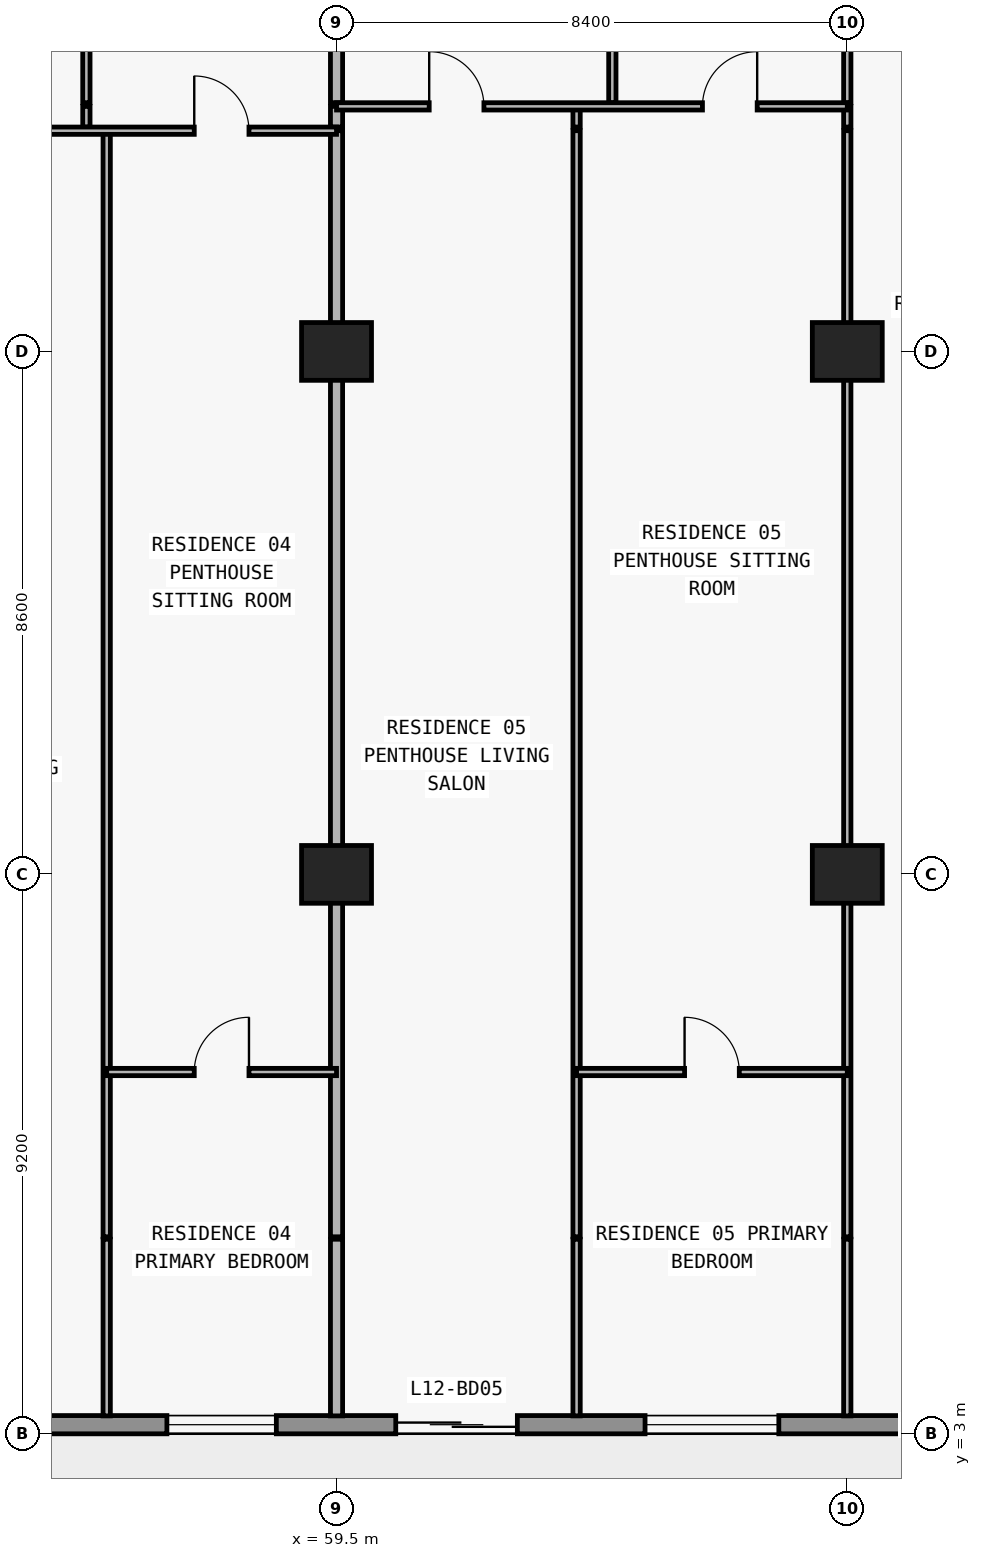
"""IFC4 building model, lengths in metres.
Left out: names, types, materials, properties, quantities, classifications, styles, units other than length and angle.
Written with IfcOpenShell. Run it as: python <this file> out.ifc"""

import sys

from ifc_helpers import new_model, si_unit, direction, frame, frame_2d, origin, origin_2d, place, context, subcontext, project, spatial, rectangle, extrude, element, fill, save


model = new_model("IFC4")
c1 = context("Model", 3, precision=1e-05, world=origin(), true_north=direction((0.0, 1.0)))
c2 = subcontext(c1, "Body", "Model", "MODEL_VIEW")
j1 = project(units=[si_unit("LENGTHUNIT", "METRE"), si_unit("PLANEANGLEUNIT", "RADIAN")], contexts=[c1])
p1 = place(None, origin())
s1 = spatial("IfcSite", under=j1, at=p1, CompositionType="ELEMENT")
p2 = place(p1, origin())
s2 = spatial("IfcBuilding", under=s1, at=p2, CompositionType="ELEMENT")
p3 = place(p2, frame((0.0, 0.0, 49.8)))
s3 = spatial("IfcBuildingStorey", under=s2, at=p3, CompositionType="ELEMENT", Elevation=49.8)
for number, where, z_axis, x_axis in (
    (1, (59.5, 12.2, 0.0), (0.0, 0.0, 1.0), (1.0, 0.0, 0.0)),
    (2, (67.9, 12.2, 0.0), (0.0, 0.0, 1.0), (1.0, 0.0, 0.0)),
    (3, (59.5, 20.8, 0.0), (0.0, 0.0, 1.0), (1.0, 0.0, 0.0)),
    (4, (67.9, 20.8, 0.0), (0.0, 0.0, 1.0), (1.0, 0.0, 0.0)),
):
    element("IfcColumn", number, at=place(p3, frame(where, z_axis=z_axis, x_axis=x_axis)), inside=s3, PredefinedType="COLUMN", context=c2, shape_type="SweptSolid", body=[
        extrude(rectangle(XDim=1.15, YDim=0.95, at=origin_2d()), origin(), (0.0, 0.0, 1.0), 3.05),
    ])
p4 = place(p3, frame((72.7, 3.15, 0.0), z_axis=(0.0, 0.0, 1.0), x_axis=(-1.0, 0.0, 0.0)))
e5 = element("IfcWall", 5, at=p4, inside=s3, PredefinedType="STANDARD", context=c2, shape_type="SweptSolid", body=[
    extrude(rectangle(XDim=67.6, YDim=0.3, at=frame_2d((33.8, 0.0))), origin(), (0.0, 0.0, 1.0), 3.05),
])
p5 = place(p4, frame((59.826, 0.0, 0.0)))
e6 = element("IfcOpeningElement", 6, at=p5, cuts=e5, PredefinedType="OPENING", context=c2, shape_type="SweptSolid", body=[
    extrude(rectangle(XDim=2.0, YDim=2.3, at=frame_2d((1.0, 1.15))), frame((0.0, 0.16, 0.0), z_axis=(0.0, -1.0, 0.0), x_axis=(1.0, 0.0, 0.0)), (0.0, 0.0, 1.0), 0.32),
])
p6 = place(p4, frame((55.526, 0.0, 0.85)))
e7 = element("IfcOpeningElement", 7, at=p6, cuts=e5, PredefinedType="OPENING", context=c2, shape_type="SweptSolid", body=[
    extrude(rectangle(XDim=2.2, YDim=1.55, at=frame_2d((1.1, 0.775))), frame((0.0, 0.16, 0.0), z_axis=(0.0, -1.0, 0.0), x_axis=(1.0, 0.0, 0.0)), (0.0, 0.0, 1.0), 0.32),
])
p7 = place(p4, frame((51.09, 0.0, 0.0)))
e8 = element("IfcOpeningElement", 8, at=p7, cuts=e5, PredefinedType="OPENING", context=c2, shape_type="SweptSolid", body=[
    extrude(rectangle(XDim=2.0, YDim=2.3, at=frame_2d((1.0, 1.15))), frame((0.0, 0.16, 0.0), z_axis=(0.0, -1.0, 0.0), x_axis=(1.0, 0.0, 0.0)), (0.0, 0.0, 1.0), 0.32),
])
p8 = place(p4, frame((46.99, 0.0, 0.85)))
e9 = element("IfcOpeningElement", 9, at=p8, cuts=e5, PredefinedType="OPENING", context=c2, shape_type="SweptSolid", body=[
    extrude(rectangle(XDim=1.8, YDim=1.55, at=frame_2d((0.9, 0.775))), frame((0.0, 0.16, 0.0), z_axis=(0.0, -1.0, 0.0), x_axis=(1.0, 0.0, 0.0)), (0.0, 0.0, 1.0), 0.32),
])
p9 = place(p4, frame((43.09, 0.0, 0.0)))
e10 = element("IfcOpeningElement", 10, at=p9, cuts=e5, PredefinedType="OPENING", context=c2, shape_type="SweptSolid", body=[
    extrude(rectangle(XDim=2.0, YDim=2.3, at=frame_2d((1.0, 1.15))), frame((0.0, 0.16, 0.0), z_axis=(0.0, -1.0, 0.0), x_axis=(1.0, 0.0, 0.0)), (0.0, 0.0, 1.0), 0.32),
])
p10 = place(p4, frame((38.41, 0.0, 0.65)))
e11 = element("IfcOpeningElement", 11, at=p10, cuts=e5, PredefinedType="OPENING", context=c2, shape_type="SweptSolid", body=[
    extrude(rectangle(XDim=2.6, YDim=1.85, at=frame_2d((1.3, 0.925))), frame((0.0, 0.16, 0.0), z_axis=(0.0, -1.0, 0.0), x_axis=(1.0, 0.0, 0.0)), (0.0, 0.0, 1.0), 0.32),
])
p11 = place(p4, frame((32.7, 0.0, 0.85)))
e12 = element("IfcOpeningElement", 12, at=p11, cuts=e5, PredefinedType="OPENING", context=c2, shape_type="SweptSolid", body=[
    extrude(rectangle(XDim=2.2, YDim=1.55, at=frame_2d((1.1, 0.775))), frame((0.0, 0.16, 0.0), z_axis=(0.0, -1.0, 0.0), x_axis=(1.0, 0.0, 0.0)), (0.0, 0.0, 1.0), 0.32),
])
p12 = place(p4, frame((24.7, 0.0, 0.85)))
e13 = element("IfcOpeningElement", 13, at=p12, cuts=e5, PredefinedType="OPENING", context=c2, shape_type="SweptSolid", body=[
    extrude(rectangle(XDim=2.2, YDim=1.55, at=frame_2d((1.1, 0.775))), frame((0.0, 0.16, 0.0), z_axis=(0.0, -1.0, 0.0), x_axis=(1.0, 0.0, 0.0)), (0.0, 0.0, 1.0), 0.32),
])
p13 = place(p4, frame((18.29, 0.0, 0.0)))
e14 = element("IfcOpeningElement", 14, at=p13, cuts=e5, PredefinedType="OPENING", context=c2, shape_type="SweptSolid", body=[
    extrude(rectangle(XDim=2.0, YDim=2.3, at=frame_2d((1.0, 1.15))), frame((0.0, 0.16, 0.0), z_axis=(0.0, -1.0, 0.0), x_axis=(1.0, 0.0, 0.0)), (0.0, 0.0, 1.0), 0.32),
])
p14 = place(p4, frame((14.19, 0.0, 0.85)))
e15 = element("IfcOpeningElement", 15, at=p14, cuts=e5, PredefinedType="OPENING", context=c2, shape_type="SweptSolid", body=[
    extrude(rectangle(XDim=1.8, YDim=1.55, at=frame_2d((0.9, 0.775))), frame((0.0, 0.16, 0.0), z_axis=(0.0, -1.0, 0.0), x_axis=(1.0, 0.0, 0.0)), (0.0, 0.0, 1.0), 0.32),
])
p15 = place(p4, frame((10.226, 0.0, 0.0)))
e16 = element("IfcOpeningElement", 16, at=p15, cuts=e5, PredefinedType="OPENING", context=c2, shape_type="SweptSolid", body=[
    extrude(rectangle(XDim=2.0, YDim=2.3, at=frame_2d((1.0, 1.15))), frame((0.0, 0.16, 0.0), z_axis=(0.0, -1.0, 0.0), x_axis=(1.0, 0.0, 0.0)), (0.0, 0.0, 1.0), 0.32),
])
p16 = place(p4, frame((5.926, 0.0, 0.85)))
e17 = element("IfcOpeningElement", 17, at=p16, cuts=e5, PredefinedType="OPENING", context=c2, shape_type="SweptSolid", body=[
    extrude(rectangle(XDim=2.2, YDim=1.55, at=frame_2d((1.1, 0.775))), frame((0.0, 0.16, 0.0), z_axis=(0.0, -1.0, 0.0), x_axis=(1.0, 0.0, 0.0)), (0.0, 0.0, 1.0), 0.32),
])
p17 = place(p3, frame((55.386, 24.49, 0.0), z_axis=(0.0, 0.0, 1.0), x_axis=(0.0, 1.0, 0.0)))
e18 = element("IfcWall", 18, at=p17, inside=s3, PredefinedType="PARTITIONING", context=c2, shape_type="SweptSolid", body=[
    extrude(rectangle(XDim=0.34, YDim=0.12, at=frame_2d((0.17, 0.0))), origin(), (0.0, 0.0, 1.0), 3.05),
])
p18 = place(p3, frame((55.386, 24.89, 0.0), z_axis=(0.0, 0.0, 1.0), x_axis=(0.0, 1.0, 0.0)))
e19 = element("IfcWall", 19, at=p18, inside=s3, PredefinedType="PARTITIONING", context=c2, shape_type="SweptSolid", body=[
    extrude(rectangle(XDim=4.69, YDim=0.12, at=frame_2d((2.345, 0.0))), origin(), (0.0, 0.0, 1.0), 3.05),
])
p19 = place(p18, frame((1.895, 0.0, 0.0)))
e20 = element("IfcOpeningElement", 20, at=p19, cuts=e19, PredefinedType="OPENING", context=c2, shape_type="SweptSolid", body=[
    extrude(rectangle(XDim=0.9, YDim=2.15, at=frame_2d((0.45, 1.075))), frame((0.0, 0.07, 0.0), z_axis=(0.0, -1.0, 0.0), x_axis=(1.0, 0.0, 0.0)), (0.0, 0.0, 1.0), 0.14),
])
p20 = place(p3, frame((55.72, 3.295, 0.0), z_axis=(0.0, 0.0, 1.0), x_axis=(0.0, 1.0, 0.0)))
e21 = element("IfcWall", 21, at=p20, inside=s3, PredefinedType="PARTITIONING", context=c2, shape_type="SweptSolid", body=[
    extrude(rectangle(XDim=2.905, YDim=0.12, at=frame_2d((1.453, 0.0))), origin(), (0.0, 0.0, 1.0), 3.05),
])
p21 = place(p3, frame((55.72, 6.24, 0.0), z_axis=(0.0, 0.0, 1.0), x_axis=(0.0, 1.0, 0.0)))
e22 = element("IfcWall", 22, at=p21, inside=s3, PredefinedType="PARTITIONING", context=c2, shape_type="SweptSolid", body=[
    extrude(rectangle(XDim=18.19, YDim=0.12, at=frame_2d((9.095, 0.0))), origin(), (0.0, 0.0, 1.0), 3.05),
])
p22 = place(p3, frame((59.5, 3.295, 0.0), z_axis=(0.0, 0.0, 1.0), x_axis=(0.0, 1.0, 0.0)))
e23 = element("IfcWall", 23, at=p22, inside=s3, PredefinedType="PARTITIONING", context=c2, shape_type="SweptSolid", body=[
    extrude(rectangle(XDim=2.905, YDim=0.2, at=frame_2d((1.453, 0.0))), origin(), (0.0, 0.0, 1.0), 3.05),
])
p23 = place(p3, frame((59.5, 6.24, 0.0), z_axis=(0.0, 0.0, 1.0), x_axis=(0.0, 1.0, 0.0)))
e24 = element("IfcWall", 24, at=p23, inside=s3, PredefinedType="PARTITIONING", context=c2, shape_type="SweptSolid", body=[
    extrude(rectangle(XDim=18.19, YDim=0.2, at=frame_2d((9.095, 0.0))), origin(), (0.0, 0.0, 1.0), 2.11),
])
p24 = place(p3, frame((59.5, 24.49, 0.0), z_axis=(0.0, 0.0, 1.0), x_axis=(0.0, 1.0, 0.0)))
e25 = element("IfcWall", 25, at=p24, inside=s3, PredefinedType="PARTITIONING", context=c2, shape_type="SweptSolid", body=[
    extrude(rectangle(XDim=0.34, YDim=0.2, at=frame_2d((0.17, 0.0))), origin(), (0.0, 0.0, 1.0), 2.11),
])
p25 = place(p3, frame((59.5, 24.89, 0.0), z_axis=(0.0, 0.0, 1.0), x_axis=(0.0, 1.0, 0.0)))
e26 = element("IfcWall", 26, at=p25, inside=s3, PredefinedType="PARTITIONING", context=c2, shape_type="SweptSolid", body=[
    extrude(rectangle(XDim=4.69, YDim=0.2, at=frame_2d((2.345, 0.0))), origin(), (0.0, 0.0, 1.0), 2.11),
])
p26 = place(p3, frame((63.448, 3.295, 0.0), z_axis=(0.0, 0.0, 1.0), x_axis=(0.0, 1.0, 0.0)))
e27 = element("IfcWall", 27, at=p26, inside=s3, PredefinedType="PARTITIONING", context=c2, shape_type="SweptSolid", body=[
    extrude(rectangle(XDim=2.905, YDim=0.12, at=frame_2d((1.453, 0.0))), origin(), (0.0, 0.0, 1.0), 3.05),
])
p27 = place(p3, frame((63.448, 6.24, 0.0), z_axis=(0.0, 0.0, 1.0), x_axis=(0.0, 1.0, 0.0)))
e28 = element("IfcWall", 28, at=p27, inside=s3, PredefinedType="PARTITIONING", context=c2, shape_type="SweptSolid", body=[
    extrude(rectangle(XDim=18.19, YDim=0.12, at=frame_2d((9.095, 0.0))), origin(), (0.0, 0.0, 1.0), 3.05),
])
p28 = place(p3, frame((63.448, 24.49, 0.0), z_axis=(0.0, 0.0, 1.0), x_axis=(0.0, 1.0, 0.0)))
e29 = element("IfcWall", 29, at=p28, inside=s3, PredefinedType="PARTITIONING", context=c2, shape_type="SweptSolid", body=[
    extrude(rectangle(XDim=0.34, YDim=0.12, at=frame_2d((0.17, 0.0))), origin(), (0.0, 0.0, 1.0), 3.05),
])
p29 = place(p3, frame((64.036, 24.89, 0.0), z_axis=(0.0, 0.0, 1.0), x_axis=(0.0, 1.0, 0.0)))
e30 = element("IfcWall", 30, at=p29, inside=s3, PredefinedType="PARTITIONING", context=c2, shape_type="SweptSolid", body=[
    extrude(rectangle(XDim=4.69, YDim=0.12, at=frame_2d((2.345, 0.0))), origin(), (0.0, 0.0, 1.0), 3.05),
])
p30 = place(p29, frame((1.895, 0.0, 0.0)))
e31 = element("IfcOpeningElement", 31, at=p30, cuts=e30, PredefinedType="OPENING", context=c2, shape_type="SweptSolid", body=[
    extrude(rectangle(XDim=0.9, YDim=2.15, at=frame_2d((0.45, 1.075))), frame((0.0, 0.07, 0.0), z_axis=(0.0, -1.0, 0.0), x_axis=(1.0, 0.0, 0.0)), (0.0, 0.0, 1.0), 0.14),
])
p31 = place(p3, frame((67.9, 3.295, 0.0), z_axis=(0.0, 0.0, 1.0), x_axis=(0.0, 1.0, 0.0)))
e32 = element("IfcWall", 32, at=p31, inside=s3, PredefinedType="PARTITIONING", context=c2, shape_type="SweptSolid", body=[
    extrude(rectangle(XDim=2.905, YDim=0.12, at=frame_2d((1.453, 0.0))), origin(), (0.0, 0.0, 1.0), 3.05),
])
p32 = place(p3, frame((67.9, 6.24, 0.0), z_axis=(0.0, 0.0, 1.0), x_axis=(0.0, 1.0, 0.0)))
e33 = element("IfcWall", 33, at=p32, inside=s3, PredefinedType="PARTITIONING", context=c2, shape_type="SweptSolid", body=[
    extrude(rectangle(XDim=18.19, YDim=0.12, at=frame_2d((9.095, 0.0))), origin(), (0.0, 0.0, 1.0), 2.11),
])
p33 = place(p3, frame((67.9, 24.49, 0.0), z_axis=(0.0, 0.0, 1.0), x_axis=(0.0, 1.0, 0.0)))
e34 = element("IfcWall", 34, at=p33, inside=s3, PredefinedType="PARTITIONING", context=c2, shape_type="SweptSolid", body=[
    extrude(rectangle(XDim=0.34, YDim=0.12, at=frame_2d((0.17, 0.0))), origin(), (0.0, 0.0, 1.0), 2.11),
])
p34 = place(p3, frame((67.9, 24.89, 0.0), z_axis=(0.0, 0.0, 1.0), x_axis=(0.0, 1.0, 0.0)))
e35 = element("IfcWall", 35, at=p34, inside=s3, PredefinedType="PARTITIONING", context=c2, shape_type="SweptSolid", body=[
    extrude(rectangle(XDim=4.69, YDim=0.12, at=frame_2d((2.345, 0.0))), origin(), (0.0, 0.0, 1.0), 2.11),
])
p35 = place(p34, frame((1.895, 0.0, 0.0)))
e36 = element("IfcOpeningElement", 36, at=p35, cuts=e35, PredefinedType="OPENING", context=c2, shape_type="SweptSolid", body=[
    extrude(rectangle(XDim=0.9, YDim=2.06, at=frame_2d((0.45, 1.03))), frame((0.0, 0.07, 0.0), z_axis=(0.0, -1.0, 0.0), x_axis=(1.0, 0.0, 0.0)), (0.0, 0.0, 1.0), 0.14),
])
p36 = place(p3, frame((55.72, 8.95, 0.0), z_axis=(0.0, 0.0, 1.0), x_axis=(1.0, 0.0, 0.0)))
e37 = element("IfcWall", 37, at=p36, inside=s3, PredefinedType="PARTITIONING", context=c2, shape_type="SweptSolid", body=[
    extrude(rectangle(XDim=3.78, YDim=0.12, at=frame_2d((1.89, 0.0))), origin(), (0.0, 0.0, 1.0), 3.05),
])
p37 = place(p36, frame((1.44, 0.0, 0.0)))
e38 = element("IfcOpeningElement", 38, at=p37, cuts=e37, PredefinedType="OPENING", context=c2, shape_type="SweptSolid", body=[
    extrude(rectangle(XDim=0.9, YDim=2.15, at=frame_2d((0.45, 1.075))), frame((0.0, 0.07, 0.0), z_axis=(0.0, -1.0, 0.0), x_axis=(1.0, 0.0, 0.0)), (0.0, 0.0, 1.0), 0.14),
])
p38 = place(p3, frame((63.448, 8.95, 0.0), z_axis=(0.0, 0.0, 1.0), x_axis=(1.0, 0.0, 0.0)))
e39 = element("IfcWall", 39, at=p38, inside=s3, PredefinedType="PARTITIONING", context=c2, shape_type="SweptSolid", body=[
    extrude(rectangle(XDim=4.452, YDim=0.12, at=frame_2d((2.226, 0.0))), origin(), (0.0, 0.0, 1.0), 3.05),
])
p39 = place(p38, frame((1.776, 0.0, 0.0)))
e40 = element("IfcOpeningElement", 40, at=p39, cuts=e39, PredefinedType="OPENING", context=c2, shape_type="SweptSolid", body=[
    extrude(rectangle(XDim=0.9, YDim=2.15, at=frame_2d((0.45, 1.075))), frame((0.0, 0.07, 0.0), z_axis=(0.0, -1.0, 0.0), x_axis=(1.0, 0.0, 0.0)), (0.0, 0.0, 1.0), 0.14),
])
p40 = place(p3, frame((51.37, 24.43, 0.0), z_axis=(0.0, 0.0, 1.0), x_axis=(1.0, 0.0, 0.0)))
e41 = element("IfcWall", 41, at=p40, inside=s3, PredefinedType="PARTITIONING", context=c2, shape_type="SweptSolid", body=[
    extrude(rectangle(XDim=8.13, YDim=0.12, at=frame_2d((4.065, 0.0))), origin(), (0.0, 0.0, 1.0), 3.05),
])
p41 = place(p40, frame((1.558, 0.0, 0.0)))
e42 = element("IfcOpeningElement", 42, at=p41, cuts=e41, PredefinedType="OPENING", context=c2, shape_type="SweptSolid", body=[
    extrude(rectangle(XDim=0.9, YDim=2.15, at=frame_2d((0.45, 1.075))), frame((0.0, 0.07, 0.0), z_axis=(0.0, -1.0, 0.0), x_axis=(1.0, 0.0, 0.0)), (0.0, 0.0, 1.0), 0.14),
])
p42 = place(p40, frame((5.79, 0.0, 0.0)))
e43 = element("IfcOpeningElement", 43, at=p42, cuts=e41, PredefinedType="OPENING", context=c2, shape_type="SweptSolid", body=[
    extrude(rectangle(XDim=0.9, YDim=2.15, at=frame_2d((0.45, 1.075))), frame((0.0, 0.07, 0.0), z_axis=(0.0, -1.0, 0.0), x_axis=(1.0, 0.0, 0.0)), (0.0, 0.0, 1.0), 0.14),
])
p43 = place(p3, frame((59.5, 24.83, 0.0), z_axis=(0.0, 0.0, 1.0), x_axis=(1.0, 0.0, 0.0)))
e44 = element("IfcWall", 44, at=p43, inside=s3, PredefinedType="PARTITIONING", context=c2, shape_type="SweptSolid", body=[
    extrude(rectangle(XDim=8.4, YDim=0.12, at=frame_2d((4.2, 0.0))), origin(), (0.0, 0.0, 1.0), 3.05),
])
p44 = place(p43, frame((1.524, 0.0, 0.0)))
e45 = element("IfcOpeningElement", 45, at=p44, cuts=e44, PredefinedType="OPENING", context=c2, shape_type="SweptSolid", body=[
    extrude(rectangle(XDim=0.9, YDim=2.15, at=frame_2d((0.45, 1.075))), frame((0.0, 0.07, 0.0), z_axis=(0.0, -1.0, 0.0), x_axis=(1.0, 0.0, 0.0)), (0.0, 0.0, 1.0), 0.14),
])
p45 = place(p43, frame((6.018, 0.0, 0.0)))
e46 = element("IfcOpeningElement", 46, at=p45, cuts=e44, PredefinedType="OPENING", context=c2, shape_type="SweptSolid", body=[
    extrude(rectangle(XDim=0.9, YDim=2.15, at=frame_2d((0.45, 1.075))), frame((0.0, 0.07, 0.0), z_axis=(0.0, -1.0, 0.0), x_axis=(1.0, 0.0, 0.0)), (0.0, 0.0, 1.0), 0.14),
])
p46 = place(p14, origin())
e47 = element("IfcWindow", 47, at=p46, inside=s3, PartitioningType="SINGLE_PANEL", PredefinedType="WINDOW", context=c2, shape_type="SweptSolid", body=[
    extrude(rectangle(XDim=1.8, YDim=1.55, at=frame_2d((0.9, 0.775))), frame((0.0, 0.03, 0.0), z_axis=(0.0, -1.0, 0.0), x_axis=(1.0, 0.0, 0.0)), (0.0, 0.0, 1.0), 0.06),
])
fill(e15, e47)
p47 = place(p15, origin())
e48 = element("IfcDoor", 48, at=p47, inside=s3, OperationType="DOUBLE_DOOR_SLIDING", PredefinedType="DOOR", context=c2, shape_type="SweptSolid", body=[
    extrude(rectangle(XDim=2.0, YDim=2.3, at=frame_2d((1.0, 1.15))), frame((0.0, 0.025, 0.0), z_axis=(0.0, -1.0, 0.0), x_axis=(1.0, 0.0, 0.0)), (0.0, 0.0, 1.0), 0.05),
])
fill(e16, e48)
p48 = place(p16, origin())
e49 = element("IfcWindow", 49, at=p48, inside=s3, PartitioningType="SINGLE_PANEL", PredefinedType="WINDOW", context=c2, shape_type="SweptSolid", body=[
    extrude(rectangle(XDim=2.2, YDim=1.55, at=frame_2d((1.1, 0.775))), frame((0.0, 0.03, 0.0), z_axis=(0.0, -1.0, 0.0), x_axis=(1.0, 0.0, 0.0)), (0.0, 0.0, 1.0), 0.06),
])
fill(e17, e49)
p49 = place(p42, origin())
e50 = element("IfcDoor", 50, at=p49, inside=s3, OperationType="SINGLE_SWING_LEFT", PredefinedType="DOOR", context=c2, shape_type="SweptSolid", body=[
    extrude(rectangle(XDim=0.9, YDim=2.15, at=frame_2d((0.45, 1.075))), frame((0.0, 0.025, 0.0), z_axis=(0.0, -1.0, 0.0), x_axis=(1.0, 0.0, 0.0)), (0.0, 0.0, 1.0), 0.05),
])
fill(e43, e50)
p50 = place(p37, origin())
e51 = element("IfcDoor", 51, at=p50, inside=s3, OperationType="SINGLE_SWING_RIGHT", PredefinedType="DOOR", context=c2, shape_type="SweptSolid", body=[
    extrude(rectangle(XDim=0.9, YDim=2.15, at=frame_2d((0.45, 1.075))), frame((0.0, 0.025, 0.0), z_axis=(0.0, -1.0, 0.0), x_axis=(1.0, 0.0, 0.0)), (0.0, 0.0, 1.0), 0.05),
])
fill(e38, e51)
p51 = place(p44, origin())
e52 = element("IfcDoor", 52, at=p51, inside=s3, OperationType="SINGLE_SWING_LEFT", PredefinedType="DOOR", context=c2, shape_type="SweptSolid", body=[
    extrude(rectangle(XDim=0.9, YDim=2.15, at=frame_2d((0.45, 1.075))), frame((0.0, 0.025, 0.0), z_axis=(0.0, -1.0, 0.0), x_axis=(1.0, 0.0, 0.0)), (0.0, 0.0, 1.0), 0.05),
])
fill(e45, e52)
p52 = place(p45, origin())
e53 = element("IfcDoor", 53, at=p52, inside=s3, OperationType="SINGLE_SWING_RIGHT", PredefinedType="DOOR", context=c2, shape_type="SweptSolid", body=[
    extrude(rectangle(XDim=0.9, YDim=2.15, at=frame_2d((0.45, 1.075))), frame((0.0, 0.025, 0.0), z_axis=(0.0, -1.0, 0.0), x_axis=(1.0, 0.0, 0.0)), (0.0, 0.0, 1.0), 0.05),
])
fill(e46, e53)
p53 = place(p39, origin())
e54 = element("IfcDoor", 54, at=p53, inside=s3, OperationType="SINGLE_SWING_LEFT", PredefinedType="DOOR", context=c2, shape_type="SweptSolid", body=[
    extrude(rectangle(XDim=0.9, YDim=2.15, at=frame_2d((0.45, 1.075))), frame((0.0, 0.025, 0.0), z_axis=(0.0, -1.0, 0.0), x_axis=(1.0, 0.0, 0.0)), (0.0, 0.0, 1.0), 0.05),
])
fill(e40, e54)
save(model, sys.argv[1])
